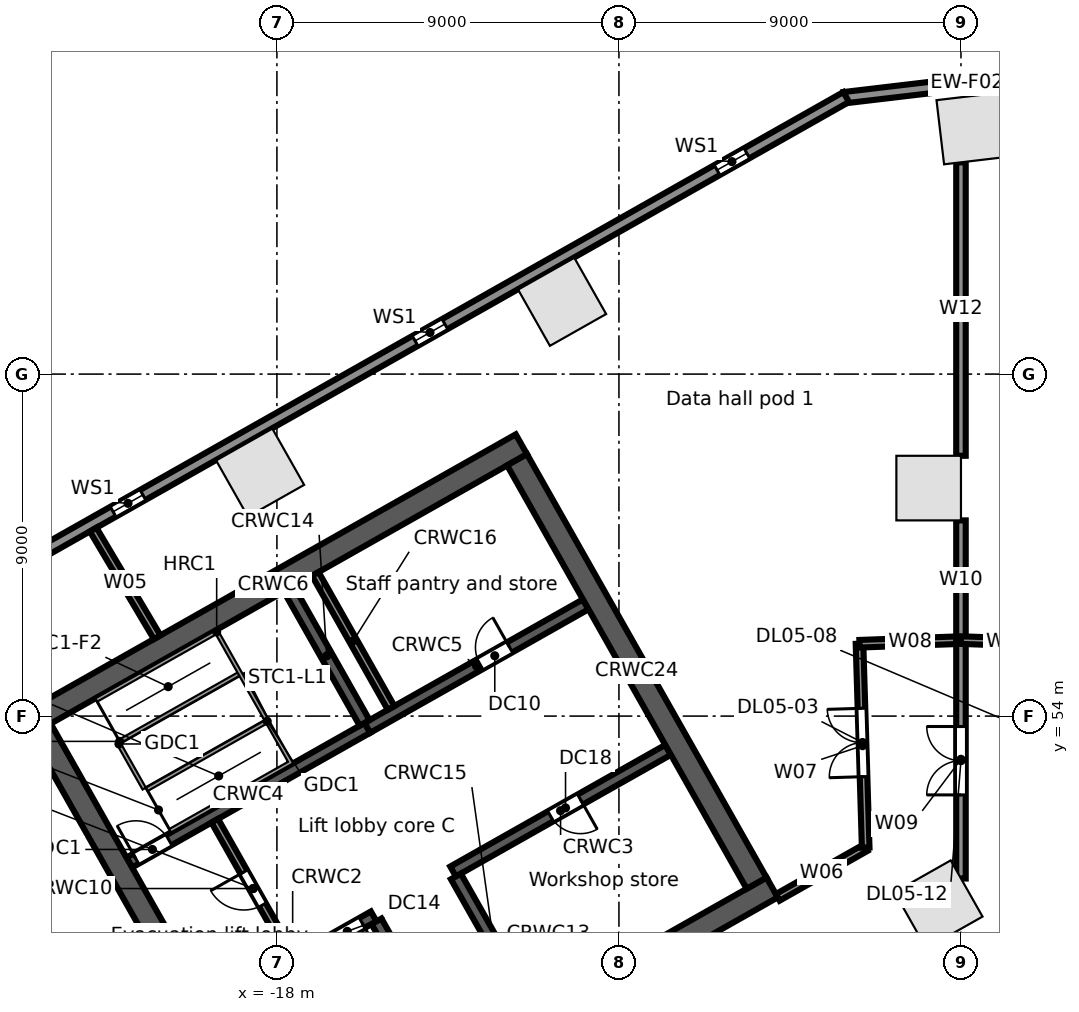
"""IFC4 building model, lengths in metres.
Left out: names, types, materials, properties, quantities, classifications, styles, units other than length and angle.
Written with IfcOpenShell. Run it as: python <this file> out.ifc"""

import sys

from ifc_helpers import new_model, si_unit, direction, frame, frame_2d, origin, origin_2d, place, context, subcontext, project, spatial, rectangle, extrude, element, fill, save


model = new_model("IFC4")
c1 = context("Model", 3, precision=1e-05, world=origin(), true_north=direction((0.0, 1.0)))
c2 = subcontext(c1, "Body", "Model", "MODEL_VIEW")
j1 = project(units=[si_unit("LENGTHUNIT", "METRE"), si_unit("PLANEANGLEUNIT", "RADIAN")], contexts=[c1])
p1 = place(None, origin())
s1 = spatial("IfcSite", under=j1, at=p1, CompositionType="ELEMENT")
p2 = place(p1, origin())
s2 = spatial("IfcBuilding", under=s1, at=p2, CompositionType="ELEMENT")
p3 = place(p2, frame((0.0, 0.0, 36.5)))
s3 = spatial("IfcBuildingStorey", under=s2, at=p3, CompositionType="ELEMENT", Elevation=36.5)
for number, where, z_axis, x_axis in (
    (1, (0.3, 69.464, 0.0), (0.0, 0.0, 1.0), (-0.993, -0.118, 0.0)),
    (2, (-10.495, 64.902, 0.0), (0.0, 0.0, 1.0), (-0.87, -0.492, 0.0)),
    (3, (-18.441, 60.406, 0.0), (0.0, 0.0, 1.0), (-0.87, -0.492, 0.0)),
    (4, (-0.591, 49.044, 0.0), (0.0, 0.0, 1.0), (0.87, 0.492, 0.0)),
    (5, (-0.85, 60.0, 0.0), (0.0, 0.0, 1.0), (0.0, 1.0, 0.0)),
):
    element("IfcColumn", number, at=place(p3, frame(where, z_axis=z_axis, x_axis=x_axis)), inside=s3, PredefinedType="COLUMN", context=c2, shape_type="SweptSolid", body=[
        extrude(rectangle(XDim=1.7, YDim=1.7, at=origin_2d()), origin(), (0.0, 0.0, 1.0), 5.0),
    ])
p4 = place(p3, frame((-3.076, 70.273, 0.0), z_axis=(0.0, 0.0, 1.0), x_axis=(0.993067743007, 0.117543429416, 0.0)))
e6 = element("IfcWall", 6, at=p4, inside=s3, PredefinedType="STANDARD", context=c2, shape_type="SweptSolid", body=[
    extrude(rectangle(XDim=6.516, YDim=0.3, at=frame_2d((3.258, 0.0))), origin(), (0.0, 0.0, 1.0), 4.68),
])
p5 = place(p3, frame((-58.745, 38.764, 0.0), z_axis=(0.0, 0.0, 1.0), x_axis=(0.870355811726, 0.492423355453, 0.0)))
e7 = element("IfcWall", 7, at=p5, inside=s3, PredefinedType="STANDARD", context=c2, shape_type="SweptSolid", body=[
    extrude(rectangle(XDim=64.025, YDim=0.3, at=frame_2d((32.013, 0.0))), origin(), (0.0, 0.0, 1.0), 4.68),
])
p6 = place(p5, frame((60.122, 0.0, 0.6)))
e8 = element("IfcOpeningElement", 8, at=p6, cuts=e7, PredefinedType="OPENING", context=c2, shape_type="SweptSolid", body=[
    extrude(rectangle(XDim=0.9, YDim=3.2, at=frame_2d((0.45, 1.6))), frame((0.0, 0.16, 0.0), z_axis=(0.0, -1.0, 0.0), x_axis=(1.0, 0.0, 0.0)), (0.0, 0.0, 1.0), 0.32),
])
p7 = place(p5, frame((50.992, 0.0, 0.6)))
e9 = element("IfcOpeningElement", 9, at=p7, cuts=e7, PredefinedType="OPENING", context=c2, shape_type="SweptSolid", body=[
    extrude(rectangle(XDim=0.9, YDim=3.2, at=frame_2d((0.45, 1.6))), frame((0.0, 0.16, 0.0), z_axis=(0.0, -1.0, 0.0), x_axis=(1.0, 0.0, 0.0)), (0.0, 0.0, 1.0), 0.32),
])
p8 = place(p5, frame((41.862, 0.0, 0.6)))
e10 = element("IfcOpeningElement", 10, at=p8, cuts=e7, PredefinedType="OPENING", context=c2, shape_type="SweptSolid", body=[
    extrude(rectangle(XDim=0.9, YDim=3.2, at=frame_2d((0.45, 1.6))), frame((0.0, 0.16, 0.0), z_axis=(0.0, -1.0, 0.0), x_axis=(1.0, 0.0, 0.0)), (0.0, 0.0, 1.0), 0.32),
])
p9 = place(p5, frame((32.732, 0.0, 0.6)))
e11 = element("IfcOpeningElement", 11, at=p9, cuts=e7, PredefinedType="OPENING", context=c2, shape_type="SweptSolid", body=[
    extrude(rectangle(XDim=0.9, YDim=3.2, at=frame_2d((0.45, 1.6))), frame((0.0, 0.16, 0.0), z_axis=(0.0, -1.0, 0.0), x_axis=(1.0, 0.0, 0.0)), (0.0, 0.0, 1.0), 0.32),
])
p10 = place(p5, frame((23.602, 0.0, 0.6)))
e12 = element("IfcOpeningElement", 12, at=p10, cuts=e7, PredefinedType="OPENING", context=c2, shape_type="SweptSolid", body=[
    extrude(rectangle(XDim=0.9, YDim=3.2, at=frame_2d((0.45, 1.6))), frame((0.0, 0.16, 0.0), z_axis=(0.0, -1.0, 0.0), x_axis=(1.0, 0.0, 0.0)), (0.0, 0.0, 1.0), 0.32),
])
p11 = place(p5, frame((14.472, 0.0, 0.6)))
e13 = element("IfcOpeningElement", 13, at=p11, cuts=e7, PredefinedType="OPENING", context=c2, shape_type="SweptSolid", body=[
    extrude(rectangle(XDim=0.9, YDim=3.2, at=frame_2d((0.45, 1.6))), frame((0.0, 0.16, 0.0), z_axis=(0.0, -1.0, 0.0), x_axis=(1.0, 0.0, 0.0)), (0.0, 0.0, 1.0), 0.32),
])
p12 = place(p5, frame((5.342, 0.0, 0.6)))
e14 = element("IfcOpeningElement", 14, at=p12, cuts=e7, PredefinedType="OPENING", context=c2, shape_type="SweptSolid", body=[
    extrude(rectangle(XDim=0.9, YDim=3.2, at=frame_2d((0.45, 1.6))), frame((0.0, 0.16, 0.0), z_axis=(0.0, -1.0, 0.0), x_axis=(1.0, 0.0, 0.0)), (0.0, 0.0, 1.0), 0.32),
])
p13 = place(p3, frame((-18.024, 42.104, 0.0), z_axis=(0.0, 0.0, 1.0), x_axis=(0.870360574057, 0.492414937962, 0.0)))
e15 = element("IfcWall", 15, at=p13, inside=s3, PredefinedType="SOLIDWALL", context=c2, shape_type="SweptSolid", body=[
    extrude(rectangle(XDim=15.0, YDim=0.6, at=frame_2d((7.5, 0.0))), origin(), (0.0, 0.0, 1.0), 4.68),
])
p14 = place(p13, frame((6.1, 0.0, 0.0)))
e16 = element("IfcOpeningElement", 16, at=p14, cuts=e15, PredefinedType="OPENING", context=c2, shape_type="SweptSolid", body=[
    extrude(rectangle(XDim=1.2, YDim=2.1, at=frame_2d((0.6, 1.05))), frame((0.0, 0.31, 0.0), z_axis=(0.0, -1.0, 0.0), x_axis=(1.0, 0.0, 0.0)), (0.0, 0.0, 1.0), 0.62),
])
p15 = place(p3, frame((-19.718, 46.316, 0.0), z_axis=(0.0, 0.0, 1.0), x_axis=(0.870353963862, 0.492426621528, 0.0)))
e17 = element("IfcWall", 17, at=p15, inside=s3, PredefinedType="SOLIDWALL", context=c2, shape_type="SweptSolid", body=[
    extrude(rectangle(XDim=4.9, YDim=0.3, at=frame_2d((2.45, 0.0))), origin(), (0.0, 0.0, 1.0), 4.68),
])
p16 = place(p15, frame((0.55, 0.0, 0.0)))
e18 = element("IfcOpeningElement", 18, at=p16, cuts=e17, PredefinedType="OPENING", context=c2, shape_type="SweptSolid", body=[
    extrude(rectangle(XDim=1.1, YDim=2.1, at=frame_2d((0.55, 1.05))), frame((0.0, 0.16, 0.0), z_axis=(0.0, -1.0, 0.0), x_axis=(1.0, 0.0, 0.0)), (0.0, 0.0, 1.0), 0.32),
])
p17 = place(p15, frame((3.65, 0.0, 0.0)))
e19 = element("IfcOpeningElement", 19, at=p17, cuts=e17, PredefinedType="OPENING", context=c2, shape_type="SweptSolid", body=[
    extrude(rectangle(XDim=0.9, YDim=2.1, at=frame_2d((0.45, 1.05))), frame((0.0, 0.16, 0.0), z_axis=(0.0, -1.0, 0.0), x_axis=(1.0, 0.0, 0.0)), (0.0, 0.0, 1.0), 0.32),
])
p18 = place(p3, frame((-13.365, 49.911, 0.0), z_axis=(0.0, 0.0, 1.0), x_axis=(0.870340995471, 0.49244954219, 0.0)))
e20 = element("IfcWall", 20, at=p18, inside=s3, PredefinedType="SOLIDWALL", context=c2, shape_type="SweptSolid", body=[
    extrude(rectangle(XDim=6.5, YDim=0.3, at=frame_2d((3.25, 0.0))), origin(), (0.0, 0.0, 1.0), 4.68),
])
p19 = place(p18, frame((2.95, 0.0, 0.0)))
e21 = element("IfcOpeningElement", 21, at=p19, cuts=e20, PredefinedType="OPENING", context=c2, shape_type="SweptSolid", body=[
    extrude(rectangle(XDim=0.9, YDim=2.1, at=frame_2d((0.45, 1.05))), frame((0.0, 0.16, 0.0), z_axis=(0.0, -1.0, 0.0), x_axis=(1.0, 0.0, 0.0)), (0.0, 0.0, 1.0), 0.32),
])
p20 = place(p3, frame((-21.885, 50.146, 0.0), z_axis=(0.0, 0.0, 1.0), x_axis=(0.870359411463, 0.492416992881, 0.0)))
e22 = element("IfcWall", 22, at=p20, inside=s3, PredefinedType="SOLIDWALL", context=c2, shape_type="SweptSolid", body=[
    extrude(rectangle(XDim=7.2, YDim=0.3, at=frame_2d((3.6, 0.0))), origin(), (0.0, 0.0, 1.0), 4.68),
])
p21 = place(p20, frame((0.2, 0.0, 0.0)))
e23 = element("IfcOpeningElement", 23, at=p21, cuts=e22, PredefinedType="OPENING", context=c2, shape_type="SweptSolid", body=[
    extrude(rectangle(XDim=1.0, YDim=2.1, at=frame_2d((0.5, 1.05))), frame((0.0, 0.16, 0.0), z_axis=(0.0, -1.0, 0.0), x_axis=(1.0, 0.0, 0.0)), (0.0, 0.0, 1.0), 0.32),
])
p22 = place(p3, frame((-15.618, 53.691, 0.0), z_axis=(0.0, 0.0, 1.0), x_axis=(0.870356769198, 0.492421663121, 0.0)))
e24 = element("IfcWall", 24, at=p22, inside=s3, PredefinedType="SOLIDWALL", context=c2, shape_type="SweptSolid", body=[
    extrude(rectangle(XDim=6.6, YDim=0.3, at=frame_2d((3.3, 0.0))), origin(), (0.0, 0.0, 1.0), 4.68),
])
p23 = place(p22, frame((3.4, 0.0, 0.0)))
e25 = element("IfcOpeningElement", 25, at=p23, cuts=e24, PredefinedType="OPENING", context=c2, shape_type="SweptSolid", body=[
    extrude(rectangle(XDim=0.9, YDim=2.1, at=frame_2d((0.45, 1.05))), frame((0.0, 0.16, 0.0), z_axis=(0.0, -1.0, 0.0), x_axis=(1.0, 0.0, 0.0)), (0.0, 0.0, 1.0), 0.32),
])
p24 = place(p3, frame((-24.623, 53.767, 0.0), z_axis=(0.0, 0.0, 1.0), x_axis=(0.870356627484, 0.492421913601, 0.0)))
e26 = element("IfcWall", 26, at=p24, inside=s3, PredefinedType="SOLIDWALL", context=c2, shape_type="SweptSolid", body=[
    extrude(rectangle(XDim=15.0, YDim=0.6, at=frame_2d((7.5, 0.0))), origin(), (0.0, 0.0, 1.0), 4.68),
])
p25 = place(p3, frame((-24.214, 53.654, 0.0), z_axis=(0.0, 0.0, 1.0), x_axis=(0.492441221355, -0.870345703448, 0.0)))
e27 = element("IfcWall", 27, at=p25, inside=s3, PredefinedType="SOLIDWALL", context=c2, shape_type="SweptSolid", body=[
    extrude(rectangle(XDim=12.8, YDim=0.6, at=frame_2d((6.4, 0.0))), origin(), (0.0, 0.0, 1.0), 4.68),
])
p26 = place(p3, frame((-19.635, 51.246, 0.0), z_axis=(0.0, 0.0, 1.0), x_axis=(0.492408451753, -0.87036424366, 0.0)))
e28 = element("IfcWall", 28, at=p26, inside=s3, PredefinedType="PARTITIONING", context=c2, shape_type="SweptSolid", body=[
    extrude(rectangle(XDim=4.1, YDim=0.2, at=frame_2d((2.05, 0.0))), origin(), (0.0, 0.0, 1.0), 4.68),
])
p27 = place(p26, frame((1.55, 0.0, 0.0)))
e29 = element("IfcOpeningElement", 29, at=p27, cuts=e28, PredefinedType="OPENING", context=c2, shape_type="SweptSolid", body=[
    extrude(rectangle(XDim=1.0, YDim=2.1, at=frame_2d((0.5, 1.05))), frame((0.0, 0.11, 0.0), z_axis=(0.0, -1.0, 0.0), x_axis=(1.0, 0.0, 0.0)), (0.0, 0.0, 1.0), 0.22),
])
p28 = place(p3, frame((-15.379, 48.599, 0.0), z_axis=(0.0, 0.0, 1.0), x_axis=(0.492394910396, -0.870371904542, 0.0)))
e30 = element("IfcWall", 30, at=p28, inside=s3, PredefinedType="SOLIDWALL", context=c2, shape_type="SweptSolid", body=[
    extrude(rectangle(XDim=4.05, YDim=0.3, at=frame_2d((2.025, 0.0))), origin(), (0.0, 0.0, 1.0), 4.68),
])
p29 = place(p3, frame((-17.686, 57.347, 0.0), z_axis=(0.0, 0.0, 1.0), x_axis=(0.492420746998, -0.870357287513, 0.0)))
e31 = element("IfcWall", 31, at=p29, inside=s3, PredefinedType="SOLIDWALL", context=c2, shape_type="SweptSolid", body=[
    extrude(rectangle(XDim=4.05, YDim=0.3, at=frame_2d((2.025, 0.0))), origin(), (0.0, 0.0, 1.0), 4.68),
])
p30 = place(p3, frame((-13.291, 49.781, 0.0), z_axis=(0.0, 0.0, 1.0), x_axis=(0.492394910396, -0.870371904542, 0.0)))
e32 = element("IfcWall", 32, at=p30, inside=s3, PredefinedType="SOLIDWALL", context=c2, shape_type="SweptSolid", body=[
    extrude(rectangle(XDim=4.05, YDim=0.3, at=frame_2d((2.025, 0.0))), origin(), (0.0, 0.0, 1.0), 4.68),
])
p31 = place(p3, frame((-16.99, 57.741, 0.0), z_axis=(0.0, 0.0, 1.0), x_axis=(0.492394910396, -0.870371904542, 0.0)))
e33 = element("IfcWall", 33, at=p31, inside=s3, PredefinedType="SOLIDWALL", context=c2, shape_type="SweptSolid", body=[
    extrude(rectangle(XDim=4.05, YDim=0.2, at=frame_2d((2.025, 0.0))), origin(), (0.0, 0.0, 1.0), 4.68),
])
p32 = place(p3, frame((-11.681, 60.744, 0.0), z_axis=(0.0, 0.0, 1.0), x_axis=(0.492426772896, -0.870353878221, 0.0)))
e34 = element("IfcWall", 34, at=p32, inside=s3, PredefinedType="SOLIDWALL", context=c2, shape_type="SweptSolid", body=[
    extrude(rectangle(XDim=12.8, YDim=0.6, at=frame_2d((6.4, 0.0))), origin(), (0.0, 0.0, 1.0), 4.68),
])
p33 = place(p3, frame((-22.835, 58.908, 0.0), z_axis=(0.0, 0.0, 1.0), x_axis=(0.511113859879, -0.859513014584, 0.0)))
e35 = element("IfcWall", 35, at=p33, inside=s3, PredefinedType="PARTITIONING", context=c2, shape_type="SweptSolid", body=[
    extrude(rectangle(XDim=3.295, YDim=0.2, at=frame_2d((1.647, 0.0))), origin(), (0.0, 0.0, 1.0), 3.96),
])
p34 = place(p3, frame((-4.821, 49.23, 0.0), z_axis=(0.0, 0.0, 1.0), x_axis=(0.870371217631, 0.492396124598, 0.0)))
e36 = element("IfcWall", 36, at=p34, inside=s3, PredefinedType="PARTITIONING", context=c2, shape_type="SweptSolid", body=[
    extrude(rectangle(XDim=2.659, YDim=0.2, at=frame_2d((1.329, 0.0))), origin(), (0.0, 0.0, 1.0), 4.68),
])
p35 = place(p3, frame((-2.67, 55.904, 0.0), z_axis=(0.0, 0.0, 1.0), x_axis=(0.030338701418, -0.999539675649, 0.0)))
e37 = element("IfcWall", 37, at=p35, inside=s3, PredefinedType="PARTITIONING", context=c2, shape_type="SweptSolid", body=[
    extrude(rectangle(XDim=5.367, YDim=0.2, at=frame_2d((2.684, 0.0))), origin(), (0.0, 0.0, 1.0), 4.68),
])
p36 = place(p35, frame((1.7, 0.0, 0.0)))
e38 = element("IfcOpeningElement", 38, at=p36, cuts=e37, PredefinedType="OPENING", context=c2, shape_type="SweptSolid", body=[
    extrude(rectangle(XDim=1.8, YDim=2.1, at=frame_2d((0.9, 1.05))), frame((0.0, 0.11, 0.0), z_axis=(0.0, -1.0, 0.0), x_axis=(1.0, 0.0, 0.0)), (0.0, 0.0, 1.0), 0.22),
])
p37 = place(p3, frame((-2.67, 55.904, 0.0), z_axis=(0.0, 0.0, 1.0), x_axis=(0.999354913865, 0.03591317494, 0.0)))
e39 = element("IfcWall", 39, at=p37, inside=s3, PredefinedType="PARTITIONING", context=c2, shape_type="SweptSolid", body=[
    extrude(rectangle(XDim=2.672, YDim=0.2, at=frame_2d((1.336, 0.0))), origin(), (0.0, 0.0, 1.0), 3.742),
])
p38 = place(p3, frame((0.0, 49.726, 0.0), z_axis=(0.0, 0.0, 1.0), x_axis=(0.0, 1.0, 0.0)))
e40 = element("IfcWall", 40, at=p38, inside=s3, PredefinedType="PARTITIONING", context=c2, shape_type="SweptSolid", body=[
    extrude(rectangle(XDim=6.274, YDim=0.25, at=frame_2d((3.137, 0.0))), origin(), (0.0, 0.0, 1.0), 4.68),
])
p39 = place(p38, frame((2.2, 0.0, 0.0)))
e41 = element("IfcOpeningElement", 41, at=p39, cuts=e40, PredefinedType="OPENING", context=c2, shape_type="SweptSolid", body=[
    extrude(rectangle(XDim=1.8, YDim=2.1, at=frame_2d((0.9, 1.05))), frame((0.0, 0.135, 0.0), z_axis=(0.0, -1.0, 0.0), x_axis=(1.0, 0.0, 0.0)), (0.0, 0.0, 1.0), 0.27),
])
p40 = place(p3, frame((0.0, 56.0, 0.0), z_axis=(0.0, 0.0, 1.0), x_axis=(0.0, 1.0, 0.0)))
e42 = element("IfcWall", 42, at=p40, inside=s3, PredefinedType="PARTITIONING", context=c2, shape_type="SweptSolid", body=[
    extrude(rectangle(XDim=3.15, YDim=0.25, at=frame_2d((1.575, 0.0))), origin(), (0.0, 0.0, 1.0), 4.68),
])
p41 = place(p3, frame((0.0, 56.0, 0.0), z_axis=(0.0, 0.0, 1.0), x_axis=(0.999349313684, -0.036068673934, 0.0)))
e43 = element("IfcWall", 43, at=p41, inside=s3, PredefinedType="PARTITIONING", context=c2, shape_type="SweptSolid", body=[
    extrude(rectangle(XDim=2.471, YDim=0.2, at=frame_2d((1.235, 0.0))), origin(), (0.0, 0.0, 1.0), 4.68),
])
p42 = place(p3, frame((0.0, 60.85, 0.0), z_axis=(0.0, 0.0, 1.0), x_axis=(0.0, 1.0, 0.0)))
e44 = element("IfcWall", 44, at=p42, inside=s3, PredefinedType="PARTITIONING", context=c2, shape_type="SweptSolid", body=[
    extrude(rectangle(XDim=7.723, YDim=0.25, at=frame_2d((3.861, 0.0))), origin(), (0.0, 0.0, 1.0), 3.952),
])
p43 = place(p6, origin())
e45 = element("IfcWindow", 45, at=p43, inside=s3, PartitioningType="SINGLE_PANEL", PredefinedType="WINDOW", context=c2, shape_type="SweptSolid", body=[
    extrude(rectangle(XDim=0.9, YDim=3.2, at=frame_2d((0.45, 1.6))), frame((0.0, 0.03, 0.0), z_axis=(0.0, -1.0, 0.0), x_axis=(1.0, 0.0, 0.0)), (0.0, 0.0, 1.0), 0.06),
])
fill(e8, e45)
p44 = place(p7, origin())
e46 = element("IfcWindow", 46, at=p44, inside=s3, PartitioningType="SINGLE_PANEL", PredefinedType="WINDOW", context=c2, shape_type="SweptSolid", body=[
    extrude(rectangle(XDim=0.9, YDim=3.2, at=frame_2d((0.45, 1.6))), frame((0.0, 0.03, 0.0), z_axis=(0.0, -1.0, 0.0), x_axis=(1.0, 0.0, 0.0)), (0.0, 0.0, 1.0), 0.06),
])
fill(e9, e46)
p45 = place(p8, origin())
e47 = element("IfcWindow", 47, at=p45, inside=s3, PartitioningType="SINGLE_PANEL", PredefinedType="WINDOW", context=c2, shape_type="SweptSolid", body=[
    extrude(rectangle(XDim=0.9, YDim=3.2, at=frame_2d((0.45, 1.6))), frame((0.0, 0.03, 0.0), z_axis=(0.0, -1.0, 0.0), x_axis=(1.0, 0.0, 0.0)), (0.0, 0.0, 1.0), 0.06),
])
fill(e10, e47)
p46 = place(p21, origin())
e48 = element("IfcDoor", 48, at=p46, inside=s3, OperationType="SINGLE_SWING_LEFT", PredefinedType="DOOR", context=c2, shape_type="SweptSolid", body=[
    extrude(rectangle(XDim=1.0, YDim=2.1, at=frame_2d((0.5, 1.05))), frame((0.0, 0.025, 0.0), z_axis=(0.0, -1.0, 0.0), x_axis=(1.0, 0.0, 0.0)), (0.0, 0.0, 1.0), 0.05),
])
fill(e23, e48)
p47 = place(p27, frame((1.0, 0.0, 0.0), z_axis=(0.0, 0.0, 1.0), x_axis=(-1.0, 0.0, 0.0)))
e49 = element("IfcDoor", 49, at=p47, inside=s3, OperationType="SINGLE_SWING_RIGHT", PredefinedType="DOOR", context=c2, shape_type="SweptSolid", body=[
    extrude(rectangle(XDim=1.0, YDim=2.1, at=frame_2d((0.5, 1.05))), frame((0.0, 0.025, 0.0), z_axis=(0.0, -1.0, 0.0), x_axis=(1.0, 0.0, 0.0)), (0.0, 0.0, 1.0), 0.05),
])
fill(e29, e49)
p48 = place(p23, origin())
e50 = element("IfcDoor", 50, at=p48, inside=s3, OperationType="SINGLE_SWING_RIGHT", PredefinedType="DOOR", context=c2, shape_type="SweptSolid", body=[
    extrude(rectangle(XDim=0.9, YDim=2.1, at=frame_2d((0.45, 1.05))), frame((0.0, 0.025, 0.0), z_axis=(0.0, -1.0, 0.0), x_axis=(1.0, 0.0, 0.0)), (0.0, 0.0, 1.0), 0.05),
])
fill(e25, e50)
p49 = place(p17, frame((0.9, 0.0, 0.0), z_axis=(0.0, 0.0, 1.0), x_axis=(-1.0, 0.0, 0.0)))
e51 = element("IfcDoor", 51, at=p49, inside=s3, OperationType="SINGLE_SWING_LEFT", PredefinedType="DOOR", context=c2, shape_type="SweptSolid", body=[
    extrude(rectangle(XDim=0.9, YDim=2.1, at=frame_2d((0.45, 1.05))), frame((0.0, 0.025, 0.0), z_axis=(0.0, -1.0, 0.0), x_axis=(1.0, 0.0, 0.0)), (0.0, 0.0, 1.0), 0.05),
])
fill(e19, e51)
p50 = place(p19, frame((0.9, 0.0, 0.0), z_axis=(0.0, 0.0, 1.0), x_axis=(-1.0, 0.0, 0.0)))
e52 = element("IfcDoor", 52, at=p50, inside=s3, OperationType="SINGLE_SWING_LEFT", PredefinedType="DOOR", context=c2, shape_type="SweptSolid", body=[
    extrude(rectangle(XDim=0.9, YDim=2.1, at=frame_2d((0.45, 1.05))), frame((0.0, 0.025, 0.0), z_axis=(0.0, -1.0, 0.0), x_axis=(1.0, 0.0, 0.0)), (0.0, 0.0, 1.0), 0.05),
])
fill(e21, e52)
p51 = place(p36, frame((1.8, 0.0, 0.0), z_axis=(0.0, 0.0, 1.0), x_axis=(-1.0, 0.0, 0.0)))
e53 = element("IfcDoor", 53, at=p51, inside=s3, OperationType="DOUBLE_DOOR_SINGLE_SWING", PredefinedType="DOOR", context=c2, shape_type="SweptSolid", body=[
    extrude(rectangle(XDim=1.8, YDim=2.1, at=frame_2d((0.9, 1.05))), frame((0.0, 0.025, 0.0), z_axis=(0.0, -1.0, 0.0), x_axis=(1.0, 0.0, 0.0)), (0.0, 0.0, 1.0), 0.05),
])
fill(e38, e53)
p52 = place(p39, origin())
e54 = element("IfcDoor", 54, at=p52, inside=s3, OperationType="DOUBLE_DOOR_SINGLE_SWING", PredefinedType="DOOR", context=c2, shape_type="SweptSolid", body=[
    extrude(rectangle(XDim=1.8, YDim=2.1, at=frame_2d((0.9, 1.05))), frame((0.0, 0.025, 0.0), z_axis=(0.0, -1.0, 0.0), x_axis=(1.0, 0.0, 0.0)), (0.0, 0.0, 1.0), 0.05),
])
fill(e41, e54)
save(model, sys.argv[1])
